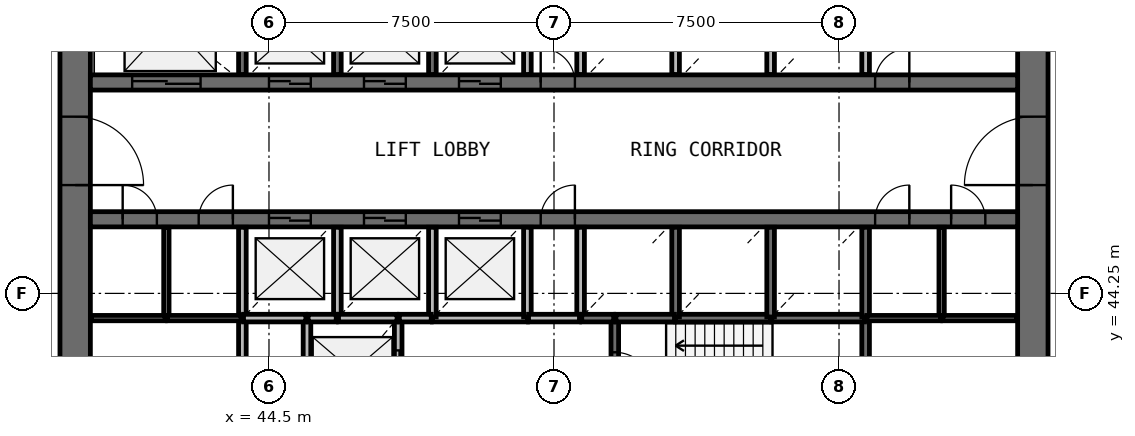
"""IFC4 building model, lengths in metres.
Left out: names, types, materials, properties, quantities, classifications, styles, units other than length and angle.
Written with IfcOpenShell. Run it as: python <this file> out.ifc"""

import sys

from ifc_helpers import new_model, si_unit, direction, frame, frame_2d, origin, place, context, subcontext, project, spatial, rectangle, extrude, source, transform, mapped, element, fill, save


model = new_model("IFC4")
c1 = context("Model", 3, precision=1e-05, world=origin(), true_north=direction((0.0, 1.0)))
c2 = subcontext(c1, "Body", "Model", "MODEL_VIEW")
j1 = project(units=[si_unit("LENGTHUNIT", "METRE"), si_unit("PLANEANGLEUNIT", "RADIAN")], contexts=[c1])
p1 = place(None, origin())
s1 = spatial("IfcSite", under=j1, at=p1, CompositionType="ELEMENT")
p2 = place(p1, origin())
s2 = spatial("IfcBuilding", under=s1, at=p2, CompositionType="ELEMENT")
p3 = place(p2, frame((0.0, 0.0, 79.8)))
s3 = spatial("IfcBuildingStorey", under=s2, at=p3, CompositionType="ELEMENT", Elevation=79.8)
p4 = place(p3, frame((64.6, 38.0, 0.0), z_axis=(0.0, 0.0, 1.0), x_axis=(0.0, 1.0, 0.0)))
e1 = element("IfcWall", 1, at=p4, inside=s3, PredefinedType="SHEAR", context=c2, shape_type="SweptSolid", body=[
    extrude(rectangle(XDim=20.0, YDim=0.8, at=frame_2d((10.0, 0.0))), origin(), (0.0, 0.0, 1.0), 4.1),
])
p5 = place(p4, frame((9.1, 0.0, 0.0)))
e2 = element("IfcOpeningElement", 2, at=p5, cuts=e1, PredefinedType="OPENING", context=c2, shape_type="SweptSolid", body=[
    extrude(rectangle(XDim=1.8, YDim=2.1, at=frame_2d((0.9, 1.05))), frame((0.0, 0.41, 0.0), z_axis=(0.0, -1.0, 0.0), x_axis=(1.0, 0.0, 0.0)), (0.0, 0.0, 1.0), 0.82),
])
p6 = place(p3, frame((39.4, 58.0, 0.0), z_axis=(0.0, 0.0, 1.0), x_axis=(0.0, -1.0, 0.0)))
e3 = element("IfcWall", 3, at=p6, inside=s3, PredefinedType="SHEAR", context=c2, shape_type="SweptSolid", body=[
    extrude(rectangle(XDim=20.0, YDim=0.8, at=frame_2d((10.0, 0.0))), origin(), (0.0, 0.0, 1.0), 4.1),
])
p7 = place(p6, frame((9.1, 0.0, 0.0)))
e4 = element("IfcOpeningElement", 4, at=p7, cuts=e3, PredefinedType="OPENING", context=c2, shape_type="SweptSolid", body=[
    extrude(rectangle(XDim=1.8, YDim=2.1, at=frame_2d((0.9, 1.05))), frame((0.0, 0.41, 0.0), z_axis=(0.0, -1.0, 0.0), x_axis=(1.0, 0.0, 0.0)), (0.0, 0.0, 1.0), 0.82),
])
p8 = place(p3, frame((39.8, 49.8, 0.0), z_axis=(0.0, 0.0, 1.0), x_axis=(1.0, 0.0, 0.0)))
e5 = element("IfcWall", 5, at=p8, inside=s3, PredefinedType="SHEAR", context=c2, shape_type="SweptSolid", body=[
    extrude(rectangle(XDim=24.4, YDim=0.4, at=frame_2d((12.2, 0.0))), origin(), (0.0, 0.0, 1.0), 4.1),
])
p9 = place(p8, frame((4.7, 0.0, 0.0)))
e6 = element("IfcOpeningElement", 6, at=p9, cuts=e5, PredefinedType="OPENING", context=c2, shape_type="SweptSolid", body=[
    extrude(rectangle(XDim=1.1, YDim=2.1, at=frame_2d((0.55, 1.05))), frame((0.0, 0.21, 0.0), z_axis=(0.0, -1.0, 0.0), x_axis=(1.0, 0.0, 0.0)), (0.0, 0.0, 1.0), 0.42),
])
p10 = place(p8, frame((7.2, 0.0, 0.0)))
e7 = element("IfcOpeningElement", 7, at=p10, cuts=e5, PredefinedType="OPENING", context=c2, shape_type="SweptSolid", body=[
    extrude(rectangle(XDim=1.1, YDim=2.1, at=frame_2d((0.55, 1.05))), frame((0.0, 0.21, 0.0), z_axis=(0.0, -1.0, 0.0), x_axis=(1.0, 0.0, 0.0)), (0.0, 0.0, 1.0), 0.42),
])
p11 = place(p8, frame((9.7, 0.0, 0.0)))
e8 = element("IfcOpeningElement", 8, at=p11, cuts=e5, PredefinedType="OPENING", context=c2, shape_type="SweptSolid", body=[
    extrude(rectangle(XDim=1.1, YDim=2.1, at=frame_2d((0.55, 1.05))), frame((0.0, 0.21, 0.0), z_axis=(0.0, -1.0, 0.0), x_axis=(1.0, 0.0, 0.0)), (0.0, 0.0, 1.0), 0.42),
])
p12 = place(p8, frame((1.1, 0.0, 0.0)))
e9 = element("IfcOpeningElement", 9, at=p12, cuts=e5, PredefinedType="OPENING", context=c2, shape_type="SweptSolid", body=[
    extrude(rectangle(XDim=1.8, YDim=2.4, at=frame_2d((0.9, 1.2))), frame((0.0, 0.21, 0.0), z_axis=(0.0, -1.0, 0.0), x_axis=(1.0, 0.0, 0.0)), (0.0, 0.0, 1.0), 0.42),
])
p13 = place(p8, frame((20.65, 0.0, 0.0)))
e10 = element("IfcOpeningElement", 10, at=p13, cuts=e5, PredefinedType="OPENING", context=c2, shape_type="SweptSolid", body=[
    extrude(rectangle(XDim=0.9, YDim=2.1, at=frame_2d((0.45, 1.05))), frame((0.0, 0.21, 0.0), z_axis=(0.0, -1.0, 0.0), x_axis=(1.0, 0.0, 0.0)), (0.0, 0.0, 1.0), 0.42),
])
p14 = place(p8, frame((11.85, 0.0, 0.0)))
e11 = element("IfcOpeningElement", 11, at=p14, cuts=e5, PredefinedType="OPENING", context=c2, shape_type="SweptSolid", body=[
    extrude(rectangle(XDim=0.9, YDim=2.1, at=frame_2d((0.45, 1.05))), frame((0.0, 0.21, 0.0), z_axis=(0.0, -1.0, 0.0), x_axis=(1.0, 0.0, 0.0)), (0.0, 0.0, 1.0), 0.42),
])
p15 = place(p3, frame((39.8, 46.2, 0.0), z_axis=(0.0, 0.0, 1.0), x_axis=(1.0, 0.0, 0.0)))
e12 = element("IfcWall", 12, at=p15, inside=s3, PredefinedType="SHEAR", context=c2, shape_type="SweptSolid", body=[
    extrude(rectangle(XDim=24.4, YDim=0.4, at=frame_2d((12.2, 0.0))), origin(), (0.0, 0.0, 1.0), 4.1),
])
p16 = place(p15, frame((4.7, 0.0, 0.0)))
e13 = element("IfcOpeningElement", 13, at=p16, cuts=e12, PredefinedType="OPENING", context=c2, shape_type="SweptSolid", body=[
    extrude(rectangle(XDim=1.1, YDim=2.1, at=frame_2d((0.55, 1.05))), frame((0.0, 0.21, 0.0), z_axis=(0.0, -1.0, 0.0), x_axis=(1.0, 0.0, 0.0)), (0.0, 0.0, 1.0), 0.42),
])
p17 = place(p15, frame((7.2, 0.0, 0.0)))
e14 = element("IfcOpeningElement", 14, at=p17, cuts=e12, PredefinedType="OPENING", context=c2, shape_type="SweptSolid", body=[
    extrude(rectangle(XDim=1.1, YDim=2.1, at=frame_2d((0.55, 1.05))), frame((0.0, 0.21, 0.0), z_axis=(0.0, -1.0, 0.0), x_axis=(1.0, 0.0, 0.0)), (0.0, 0.0, 1.0), 0.42),
])
p18 = place(p15, frame((9.7, 0.0, 0.0)))
e15 = element("IfcOpeningElement", 15, at=p18, cuts=e12, PredefinedType="OPENING", context=c2, shape_type="SweptSolid", body=[
    extrude(rectangle(XDim=1.1, YDim=2.1, at=frame_2d((0.55, 1.05))), frame((0.0, 0.21, 0.0), z_axis=(0.0, -1.0, 0.0), x_axis=(1.0, 0.0, 0.0)), (0.0, 0.0, 1.0), 0.42),
])
p19 = place(p15, frame((20.65, 0.0, 0.0)))
e16 = element("IfcOpeningElement", 16, at=p19, cuts=e12, PredefinedType="OPENING", context=c2, shape_type="SweptSolid", body=[
    extrude(rectangle(XDim=0.9, YDim=2.1, at=frame_2d((0.45, 1.05))), frame((0.0, 0.21, 0.0), z_axis=(0.0, -1.0, 0.0), x_axis=(1.0, 0.0, 0.0)), (0.0, 0.0, 1.0), 0.42),
])
p20 = place(p15, frame((22.65, 0.0, 0.0)))
e17 = element("IfcOpeningElement", 17, at=p20, cuts=e12, PredefinedType="OPENING", context=c2, shape_type="SweptSolid", body=[
    extrude(rectangle(XDim=0.9, YDim=2.1, at=frame_2d((0.45, 1.05))), frame((0.0, 0.21, 0.0), z_axis=(0.0, -1.0, 0.0), x_axis=(1.0, 0.0, 0.0)), (0.0, 0.0, 1.0), 0.42),
])
p21 = place(p15, frame((0.85, 0.0, 0.0)))
e18 = element("IfcOpeningElement", 18, at=p21, cuts=e12, PredefinedType="OPENING", context=c2, shape_type="SweptSolid", body=[
    extrude(rectangle(XDim=0.9, YDim=2.1, at=frame_2d((0.45, 1.05))), frame((0.0, 0.21, 0.0), z_axis=(0.0, -1.0, 0.0), x_axis=(1.0, 0.0, 0.0)), (0.0, 0.0, 1.0), 0.42),
])
p22 = place(p15, frame((2.85, 0.0, 0.0)))
e19 = element("IfcOpeningElement", 19, at=p22, cuts=e12, PredefinedType="OPENING", context=c2, shape_type="SweptSolid", body=[
    extrude(rectangle(XDim=0.9, YDim=2.1, at=frame_2d((0.45, 1.05))), frame((0.0, 0.21, 0.0), z_axis=(0.0, -1.0, 0.0), x_axis=(1.0, 0.0, 0.0)), (0.0, 0.0, 1.0), 0.42),
])
p23 = place(p15, frame((11.85, 0.0, 0.0)))
e20 = element("IfcOpeningElement", 20, at=p23, cuts=e12, PredefinedType="OPENING", context=c2, shape_type="SweptSolid", body=[
    extrude(rectangle(XDim=0.9, YDim=2.1, at=frame_2d((0.45, 1.05))), frame((0.0, 0.21, 0.0), z_axis=(0.0, -1.0, 0.0), x_axis=(1.0, 0.0, 0.0)), (0.0, 0.0, 1.0), 0.42),
])
for number, where, z_axis, x_axis in (
    (21, (43.8, 43.6, 0.0), (0.0, 0.0, 1.0), (0.0, -1.0, 0.0)),
    (22, (45.5, 43.6, 0.0), (0.0, 0.0, 1.0), (0.0, -1.0, 0.0)),
):
    element("IfcWall", number, at=place(p3, frame(where, z_axis=z_axis, x_axis=x_axis)), inside=s3, PredefinedType="SOLIDWALL", context=c2, shape_type="SweptSolid", body=[
        extrude(rectangle(XDim=2.8, YDim=0.2, at=frame_2d((1.4, 0.0))), origin(), (0.0, 0.0, 1.0), 3.7),
    ])
p24 = place(p3, frame((47.9, 40.83, 0.0), z_axis=(0.0, 0.0, 1.0), x_axis=(0.0, 1.0, 0.0)))
e23 = element("IfcWall", 23, at=p24, inside=s3, PredefinedType="SOLIDWALL", context=c2, shape_type="SweptSolid", body=[
    extrude(rectangle(XDim=2.77, YDim=0.2, at=frame_2d((1.385, 0.0))), origin(), (0.0, 0.0, 1.0), 3.7),
])
p25 = place(p24, frame((0.82, 0.0, 0.0)))
e24 = element("IfcOpeningElement", 24, at=p25, cuts=e23, PredefinedType="OPENING", context=c2, shape_type="SweptSolid", body=[
    extrude(rectangle(XDim=1.1, YDim=2.1, at=frame_2d((0.55, 1.05))), frame((0.0, 0.11, 0.0), z_axis=(0.0, -1.0, 0.0), x_axis=(1.0, 0.0, 0.0)), (0.0, 0.0, 1.0), 0.22),
])
p26 = place(p3, frame((60.2, 40.83, 0.0), z_axis=(0.0, 0.0, 1.0), x_axis=(0.0, 1.0, 0.0)))
e25 = element("IfcWall", 25, at=p26, inside=s3, PredefinedType="SOLIDWALL", context=c2, shape_type="SweptSolid", body=[
    extrude(rectangle(XDim=2.77, YDim=0.2, at=frame_2d((1.385, 0.0))), origin(), (0.0, 0.0, 1.0), 3.7),
])
p27 = place(p3, frame((53.6, 43.6, 0.0), z_axis=(0.0, 0.0, 1.0), x_axis=(0.0, -1.0, 0.0)))
e26 = element("IfcWall", 26, at=p27, inside=s3, PredefinedType="SOLIDWALL", context=c2, shape_type="SweptSolid", body=[
    extrude(rectangle(XDim=2.77, YDim=0.2, at=frame_2d((1.385, 0.0))), origin(), (0.0, 0.0, 1.0), 3.7),
])
p28 = place(p27, frame((0.9, 0.0, 0.0)))
e27 = element("IfcOpeningElement", 27, at=p28, cuts=e26, PredefinedType="OPENING", context=c2, shape_type="SweptSolid", body=[
    extrude(rectangle(XDim=1.0, YDim=2.1, at=frame_2d((0.5, 1.05))), frame((0.0, 0.11, 0.0), z_axis=(0.0, -1.0, 0.0), x_axis=(1.0, 0.0, 0.0)), (0.0, 0.0, 1.0), 0.22),
])
for number, where, z_axis, x_axis in (
    (28, (48.8, 43.6, 0.0), (0.0, 0.0, 1.0), (1.0, 0.0, 0.0)),
    (29, (55.2, 43.6, 0.0), (0.0, 0.0, 1.0), (1.0, 0.0, 0.0)),
):
    element("IfcWall", number, at=place(p3, frame(where, z_axis=z_axis, x_axis=x_axis)), inside=s3, PredefinedType="SOLIDWALL", context=c2, shape_type="SweptSolid", body=[
        extrude(rectangle(XDim=2.5, YDim=0.2, at=frame_2d((1.25, 0.0))), origin(), (0.0, 0.0, 1.0), 3.7),
    ])
p29 = place(p3, frame((57.73, 43.6, 0.0), z_axis=(0.0, 0.0, 1.0), x_axis=(1.0, 0.0, 0.0)))
e30 = element("IfcWall", 30, at=p29, inside=s3, PredefinedType="SOLIDWALL", context=c2, shape_type="SweptSolid", body=[
    extrude(rectangle(XDim=2.44, YDim=0.2, at=frame_2d((1.22, 0.0))), origin(), (0.0, 0.0, 1.0), 3.7),
])
for number, where, z_axis, x_axis in (
    (31, (43.8, 45.99, 0.0), (0.0, 0.0, 1.0), (0.0, -1.0, 0.0)),
    (32, (43.8, 52.37, 0.0), (0.0, 0.0, 1.0), (0.0, -1.0, 0.0)),
):
    element("IfcWall", number, at=place(p3, frame(where, z_axis=z_axis, x_axis=x_axis)), inside=s3, PredefinedType="SOLIDWALL", context=c2, shape_type="SweptSolid", body=[
        extrude(rectangle(XDim=2.36, YDim=0.2, at=frame_2d((1.18, 0.0))), origin(), (0.0, 0.0, 1.0), 3.7),
    ])
p30 = place(p3, frame((46.3, 43.6, 0.0), z_axis=(0.0, 0.0, 1.0), x_axis=(0.0, 1.0, 0.0)))
e33 = element("IfcWall", 33, at=p30, inside=s3, PredefinedType="SOLIDWALL", context=c2, shape_type="SweptSolid", body=[
    extrude(rectangle(XDim=2.39, YDim=0.2, at=frame_2d((1.195, 0.0))), origin(), (0.0, 0.0, 1.0), 3.7),
])
for number, where, z_axis, x_axis in (
    (34, (46.3, 50.01, 0.0), (0.0, 0.0, 1.0), (0.0, 1.0, 0.0)),
    (35, (48.8, 43.63, 0.0), (0.0, 0.0, 1.0), (0.0, 1.0, 0.0)),
    (36, (48.8, 50.01, 0.0), (0.0, 0.0, 1.0), (0.0, 1.0, 0.0)),
    (37, (51.3, 43.63, 0.0), (0.0, 0.0, 1.0), (0.0, 1.0, 0.0)),
):
    element("IfcWall", number, at=place(p3, frame(where, z_axis=z_axis, x_axis=x_axis)), inside=s3, PredefinedType="SOLIDWALL", context=c2, shape_type="SweptSolid", body=[
        extrude(rectangle(XDim=2.36, YDim=0.2, at=frame_2d((1.18, 0.0))), origin(), (0.0, 0.0, 1.0), 3.7),
    ])
for number, where, z_axis, x_axis in (
    (38, (51.3, 50.01, 0.0), (0.0, 0.0, 1.0), (0.0, 1.0, 0.0)),
    (39, (52.7, 45.99, 0.0), (0.0, 0.0, 1.0), (0.0, -1.0, 0.0)),
):
    element("IfcWall", number, at=place(p3, frame(where, z_axis=z_axis, x_axis=x_axis)), inside=s3, PredefinedType="SOLIDWALL", context=c2, shape_type="SweptSolid", body=[
        extrude(rectangle(XDim=2.39, YDim=0.2, at=frame_2d((1.195, 0.0))), origin(), (0.0, 0.0, 1.0), 3.7),
    ])
for number, where, z_axis, x_axis in (
    (40, (52.7, 52.37, 0.0), (0.0, 0.0, 1.0), (0.0, -1.0, 0.0)),
    (41, (55.2, 43.63, 0.0), (0.0, 0.0, 1.0), (0.0, 1.0, 0.0)),
    (42, (55.2, 50.01, 0.0), (0.0, 0.0, 1.0), (0.0, 1.0, 0.0)),
    (43, (57.7, 43.63, 0.0), (0.0, 0.0, 1.0), (0.0, 1.0, 0.0)),
):
    element("IfcWall", number, at=place(p3, frame(where, z_axis=z_axis, x_axis=x_axis)), inside=s3, PredefinedType="SOLIDWALL", context=c2, shape_type="SweptSolid", body=[
        extrude(rectangle(XDim=2.36, YDim=0.2, at=frame_2d((1.18, 0.0))), origin(), (0.0, 0.0, 1.0), 3.7),
    ])
p31 = place(p3, frame((57.7, 50.01, 0.0), z_axis=(0.0, 0.0, 1.0), x_axis=(0.0, 1.0, 0.0)))
e44 = element("IfcWall", 44, at=p31, inside=s3, PredefinedType="SOLIDWALL", context=c2, shape_type="SweptSolid", body=[
    extrude(rectangle(XDim=2.39, YDim=0.2, at=frame_2d((1.195, 0.0))), origin(), (0.0, 0.0, 1.0), 3.7),
])
for number, where, z_axis, x_axis in (
    (45, (60.2, 43.63, 0.0), (0.0, 0.0, 1.0), (0.0, 1.0, 0.0)),
    (46, (60.2, 50.01, 0.0), (0.0, 0.0, 1.0), (0.0, 1.0, 0.0)),
):
    element("IfcWall", number, at=place(p3, frame(where, z_axis=z_axis, x_axis=x_axis)), inside=s3, PredefinedType="SOLIDWALL", context=c2, shape_type="SweptSolid", body=[
        extrude(rectangle(XDim=2.36, YDim=0.2, at=frame_2d((1.18, 0.0))), origin(), (0.0, 0.0, 1.0), 3.7),
    ])
p32 = place(p3, frame((43.83, 43.6, 0.0), z_axis=(0.0, 0.0, 1.0), x_axis=(1.0, 0.0, 0.0)))
e47 = element("IfcWall", 47, at=p32, inside=s3, PredefinedType="SOLIDWALL", context=c2, shape_type="SweptSolid", body=[
    extrude(rectangle(XDim=1.64, YDim=0.2, at=frame_2d((0.82, 0.0))), origin(), (0.0, 0.0, 1.0), 3.7),
])
for number, where, z_axis, x_axis in (
    (48, (46.33, 43.6, 0.0), (0.0, 0.0, 1.0), (1.0, 0.0, 0.0)),
    (49, (53.63, 43.6, 0.0), (0.0, 0.0, 1.0), (1.0, 0.0, 0.0)),
):
    element("IfcWall", number, at=place(p3, frame(where, z_axis=z_axis, x_axis=x_axis)), inside=s3, PredefinedType="SOLIDWALL", context=c2, shape_type="SweptSolid", body=[
        extrude(rectangle(XDim=1.54, YDim=0.2, at=frame_2d((0.77, 0.0))), origin(), (0.0, 0.0, 1.0), 3.7),
    ])
p33 = place(p3, frame((52.67, 43.6, 0.0), z_axis=(0.0, 0.0, 1.0), x_axis=(-1.0, 0.0, 0.0)))
e50 = element("IfcWall", 50, at=p33, inside=s3, PredefinedType="SOLIDWALL", context=c2, shape_type="SweptSolid", body=[
    extrude(rectangle(XDim=1.34, YDim=0.2, at=frame_2d((0.67, 0.0))), origin(), (0.0, 0.0, 1.0), 3.7),
])
for number, where, z_axis, x_axis in (
    (51, (47.93, 43.6, 0.0), (0.0, 0.0, 1.0), (1.0, 0.0, 0.0)),
    (52, (52.73, 43.6, 0.0), (0.0, 0.0, 1.0), (1.0, 0.0, 0.0)),
):
    element("IfcWall", number, at=place(p3, frame(where, z_axis=z_axis, x_axis=x_axis)), inside=s3, PredefinedType="SOLIDWALL", context=c2, shape_type="SweptSolid", body=[
        extrude(rectangle(XDim=0.84, YDim=0.2, at=frame_2d((0.42, 0.0))), origin(), (0.0, 0.0, 1.0), 3.7),
    ])
p34 = place(p3, frame((45.53, 43.6, 0.0), z_axis=(0.0, 0.0, 1.0), x_axis=(1.0, 0.0, 0.0)))
e53 = element("IfcWall", 53, at=p34, inside=s3, PredefinedType="SOLIDWALL", context=c2, shape_type="SweptSolid", body=[
    extrude(rectangle(XDim=0.74, YDim=0.2, at=frame_2d((0.37, 0.0))), origin(), (0.0, 0.0, 1.0), 3.7),
])
for number, where, z_axis, x_axis in (
    (54, (41.8, 43.6, 0.0), (0.0, 0.0, 1.0), (0.0, 1.0, 0.0)),
    (55, (62.2, 43.6, 0.0), (0.0, 0.0, 1.0), (0.0, 1.0, 0.0)),
):
    element("IfcWall", number, at=place(p3, frame(where, z_axis=z_axis, x_axis=x_axis)), inside=s3, PredefinedType="PARTITIONING", context=c2, shape_type="SweptSolid", body=[
        extrude(rectangle(XDim=2.39, YDim=0.14, at=frame_2d((1.195, 0.0))), origin(), (0.0, 0.0, 1.0), 2.9),
    ])
for number, where, z_axis, x_axis in (
    (56, (43.77, 43.6, 0.0), (0.0, 0.0, 1.0), (-1.0, 0.0, 0.0)),
    (57, (60.23, 43.6, 0.0), (0.0, 0.0, 1.0), (1.0, 0.0, 0.0)),
):
    element("IfcWall", number, at=place(p3, frame(where, z_axis=z_axis, x_axis=x_axis)), inside=s3, PredefinedType="PARTITIONING", context=c2, shape_type="SweptSolid", body=[
        extrude(rectangle(XDim=1.94, YDim=0.14, at=frame_2d((0.97, 0.0))), origin(), (0.0, 0.0, 1.0), 2.9),
    ])
for number, where, z_axis, x_axis in (
    (58, (62.23, 43.6, 0.0), (0.0, 0.0, 1.0), (1.0, 0.0, 0.0)),
    (59, (41.77, 43.6, 0.0), (0.0, 0.0, 1.0), (-1.0, 0.0, 0.0)),
):
    element("IfcWall", number, at=place(p3, frame(where, z_axis=z_axis, x_axis=x_axis)), inside=s3, PredefinedType="PARTITIONING", context=c2, shape_type="SweptSolid", body=[
        extrude(rectangle(XDim=1.95, YDim=0.14, at=frame_2d((0.975, 0.0))), origin(), (0.0, 0.0, 1.0), 2.9),
    ])
m1 = source(origin(), c2, "Body", "SweptSolid", [
    extrude(rectangle(XDim=1.8, YDim=2.1, at=frame_2d((0.9, 1.05))), frame((0.0, 0.025, 0.0), z_axis=(0.0, -1.0, 0.0), x_axis=(1.0, 0.0, 0.0)), (0.0, 0.0, 1.0), 0.05),
])
p35 = place(p7, origin())
e60 = element("IfcDoor", 60, at=p35, inside=s3, OperationType="SINGLE_SWING_RIGHT", PredefinedType="DOOR", context=c2, shape_type="MappedRepresentation", body=[
    mapped(m1, transform((0.0, 0.0, 0.0), scale=1.0)),
])
fill(e4, e60)
p36 = place(p5, origin())
e61 = element("IfcDoor", 61, at=p36, inside=s3, OperationType="SINGLE_SWING_LEFT", PredefinedType="DOOR", context=c2, shape_type="MappedRepresentation", body=[
    mapped(m1, transform((0.0, 0.0, 0.0), scale=1.0)),
])
fill(e2, e61)
m2 = source(origin(), c2, "Body", "SweptSolid", [
    extrude(rectangle(XDim=1.1, YDim=2.1, at=frame_2d((0.55, 1.05))), frame((0.0, 0.025, 0.0), z_axis=(0.0, -1.0, 0.0), x_axis=(1.0, 0.0, 0.0)), (0.0, 0.0, 1.0), 0.05),
])
p37 = place(p9, origin())
e62 = element("IfcDoor", 62, at=p37, inside=s3, OperationType="DOUBLE_DOOR_SLIDING", PredefinedType="USERDEFINED", context=c2, shape_type="MappedRepresentation", body=[
    mapped(m2, transform((0.0, 0.0, 0.0), scale=1.0)),
])
fill(e6, e62)
p38 = place(p10, origin())
e63 = element("IfcDoor", 63, at=p38, inside=s3, OperationType="DOUBLE_DOOR_SLIDING", PredefinedType="USERDEFINED", context=c2, shape_type="MappedRepresentation", body=[
    mapped(m2, transform((0.0, 0.0, 0.0), scale=1.0)),
])
fill(e7, e63)
p39 = place(p11, origin())
e64 = element("IfcDoor", 64, at=p39, inside=s3, OperationType="DOUBLE_DOOR_SLIDING", PredefinedType="USERDEFINED", context=c2, shape_type="MappedRepresentation", body=[
    mapped(m2, transform((0.0, 0.0, 0.0), scale=1.0)),
])
fill(e8, e64)
p40 = place(p16, origin())
e65 = element("IfcDoor", 65, at=p40, inside=s3, OperationType="DOUBLE_DOOR_SLIDING", PredefinedType="USERDEFINED", context=c2, shape_type="MappedRepresentation", body=[
    mapped(m2, transform((0.0, 0.0, 0.0), scale=1.0)),
])
fill(e13, e65)
p41 = place(p17, origin())
e66 = element("IfcDoor", 66, at=p41, inside=s3, OperationType="DOUBLE_DOOR_SLIDING", PredefinedType="USERDEFINED", context=c2, shape_type="MappedRepresentation", body=[
    mapped(m2, transform((0.0, 0.0, 0.0), scale=1.0)),
])
fill(e14, e66)
p42 = place(p18, origin())
e67 = element("IfcDoor", 67, at=p42, inside=s3, OperationType="DOUBLE_DOOR_SLIDING", PredefinedType="USERDEFINED", context=c2, shape_type="MappedRepresentation", body=[
    mapped(m2, transform((0.0, 0.0, 0.0), scale=1.0)),
])
fill(e15, e67)
p43 = place(p25, origin())
e68 = element("IfcDoor", 68, at=p43, inside=s3, OperationType="DOUBLE_DOOR_SLIDING", PredefinedType="USERDEFINED", context=c2, shape_type="MappedRepresentation", body=[
    mapped(m2, transform((0.0, 0.0, 0.0), scale=1.0)),
])
fill(e24, e68)
m3 = source(origin(), c2, "Body", "SweptSolid", [
    extrude(rectangle(XDim=1.8, YDim=2.4, at=frame_2d((0.9, 1.2))), frame((0.0, 0.025, 0.0), z_axis=(0.0, -1.0, 0.0), x_axis=(1.0, 0.0, 0.0)), (0.0, 0.0, 1.0), 0.05),
])
p44 = place(p12, origin())
e69 = element("IfcDoor", 69, at=p44, inside=s3, OperationType="DOUBLE_DOOR_SLIDING", PredefinedType="USERDEFINED", context=c2, shape_type="MappedRepresentation", body=[
    mapped(m3, transform((0.0, 0.0, 0.0), scale=1.0)),
])
fill(e9, e69)
m4 = source(origin(), c2, "Body", "SweptSolid", [
    extrude(rectangle(XDim=1.0, YDim=2.1, at=frame_2d((0.5, 1.05))), frame((0.0, 0.025, 0.0), z_axis=(0.0, -1.0, 0.0), x_axis=(1.0, 0.0, 0.0)), (0.0, 0.0, 1.0), 0.05),
])
p45 = place(p28, origin())
e70 = element("IfcDoor", 70, at=p45, inside=s3, OperationType="SINGLE_SWING_RIGHT", PredefinedType="DOOR", context=c2, shape_type="MappedRepresentation", body=[
    mapped(m4, transform((0.0, 0.0, 0.0), scale=1.0)),
])
fill(e27, e70)
m5 = source(origin(), c2, "Body", "SweptSolid", [
    extrude(rectangle(XDim=0.9, YDim=2.1, at=frame_2d((0.45, 1.05))), frame((0.0, 0.025, 0.0), z_axis=(0.0, -1.0, 0.0), x_axis=(1.0, 0.0, 0.0)), (0.0, 0.0, 1.0), 0.05),
])
p46 = place(p19, origin())
e71 = element("IfcDoor", 71, at=p46, inside=s3, OperationType="SINGLE_SWING_RIGHT", PredefinedType="DOOR", context=c2, shape_type="MappedRepresentation", body=[
    mapped(m5, transform((0.0, 0.0, 0.0), scale=1.0)),
])
fill(e16, e71)
p47 = place(p20, origin())
e72 = element("IfcDoor", 72, at=p47, inside=s3, OperationType="SINGLE_SWING_LEFT", PredefinedType="DOOR", context=c2, shape_type="MappedRepresentation", body=[
    mapped(m5, transform((0.0, 0.0, 0.0), scale=1.0)),
])
fill(e17, e72)
p48 = place(p13, origin())
e73 = element("IfcDoor", 73, at=p48, inside=s3, OperationType="SINGLE_SWING_RIGHT", PredefinedType="DOOR", context=c2, shape_type="MappedRepresentation", body=[
    mapped(m5, transform((0.0, 0.0, 0.0), scale=1.0)),
])
fill(e10, e73)
p49 = place(p21, origin())
e74 = element("IfcDoor", 74, at=p49, inside=s3, OperationType="SINGLE_SWING_LEFT", PredefinedType="DOOR", context=c2, shape_type="MappedRepresentation", body=[
    mapped(m5, transform((0.0, 0.0, 0.0), scale=1.0)),
])
fill(e18, e74)
p50 = place(p22, origin())
e75 = element("IfcDoor", 75, at=p50, inside=s3, OperationType="SINGLE_SWING_RIGHT", PredefinedType="DOOR", context=c2, shape_type="MappedRepresentation", body=[
    mapped(m5, transform((0.0, 0.0, 0.0), scale=1.0)),
])
fill(e19, e75)
p51 = place(p14, origin())
e76 = element("IfcDoor", 76, at=p51, inside=s3, OperationType="SINGLE_SWING_LEFT", PredefinedType="DOOR", context=c2, shape_type="MappedRepresentation", body=[
    mapped(m5, transform((0.0, 0.0, 0.0), scale=1.0)),
])
fill(e11, e76)
p52 = place(p23, origin())
e77 = element("IfcDoor", 77, at=p52, inside=s3, OperationType="SINGLE_SWING_RIGHT", PredefinedType="DOOR", context=c2, shape_type="MappedRepresentation", body=[
    mapped(m5, transform((0.0, 0.0, 0.0), scale=1.0)),
])
fill(e20, e77)
save(model, sys.argv[1])
